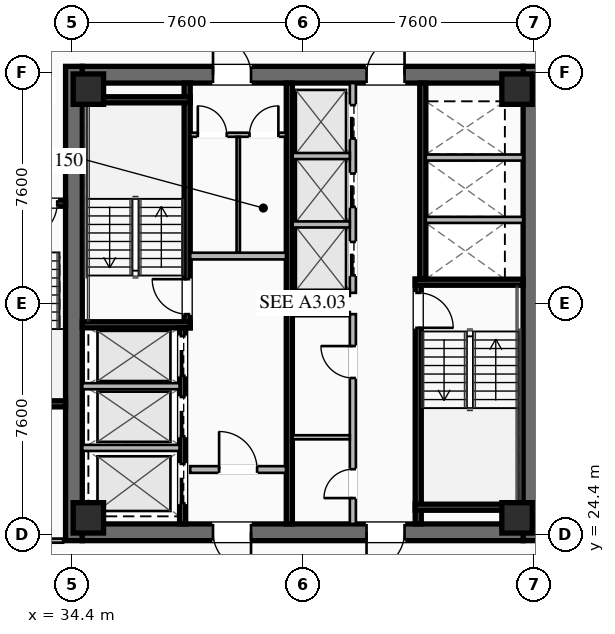
"""IFC4 building model, lengths in metres.
Left out: names, types, materials, properties, quantities, classifications, styles, units other than length and angle.
Written with IfcOpenShell. Run it as: python <this file> out.ifc"""

import sys

from ifc_helpers import new_model, si_unit, direction, frame, frame_2d, origin, origin_2d, place, context, subcontext, project, spatial, rectangle, hollow_rectangle, extrude, element, fill, save


model = new_model("IFC4")
c1 = context("Model", 3, precision=1e-05, world=origin(), true_north=direction((0.0, 1.0)))
c2 = subcontext(c1, "Body", "Model", "MODEL_VIEW")
j1 = project(units=[si_unit("LENGTHUNIT", "METRE"), si_unit("PLANEANGLEUNIT", "RADIAN")], contexts=[c1])
p1 = place(None, origin())
s1 = spatial("IfcSite", under=j1, at=p1, CompositionType="ELEMENT")
p2 = place(p1, origin())
s2 = spatial("IfcBuilding", under=s1, at=p2, CompositionType="ELEMENT")
p3 = place(p2, frame((0.0, 0.0, 125.05)))
s3 = spatial("IfcBuildingStorey", under=s2, at=p3, CompositionType="ELEMENT", Elevation=125.05)
for number, where, z_axis, x_axis in (
    (1, (34.475, 24.2, 0.0), (0.0, 0.0, 1.0), (0.0, 1.0, 0.0)),
    (2, (49.525, 39.8, 0.0), (0.0, 0.0, 1.0), (0.0, -1.0, 0.0)),
):
    element("IfcWall", number, at=place(p3, frame(where, z_axis=z_axis, x_axis=x_axis)), inside=s3, PredefinedType="SHEAR", context=c2, shape_type="SweptSolid", body=[
        extrude(rectangle(XDim=15.6, YDim=0.55, at=frame_2d((7.8, 0.0))), origin(), (0.0, 0.0, 1.0), 3.55),
    ])
p4 = place(p3, frame((49.25, 24.475, 0.0), z_axis=(0.0, 0.0, 1.0), x_axis=(-1.0, 0.0, 0.0)))
e3 = element("IfcWall", 3, at=p4, inside=s3, PredefinedType="SHEAR", context=c2, shape_type="SweptSolid", body=[
    extrude(rectangle(XDim=14.5, YDim=0.55, at=frame_2d((7.25, 0.0))), origin(), (0.0, 0.0, 1.0), 3.55),
])
p5 = place(p4, frame((8.95, 0.0, 0.0)))
e4 = element("IfcOpeningElement", 4, at=p5, cuts=e3, PredefinedType="OPENING", context=c2, shape_type="SweptSolid", body=[
    extrude(rectangle(XDim=1.25, YDim=2.25, at=frame_2d((0.625, 1.125))), frame((0.0, 0.285, 0.0), z_axis=(0.0, -1.0, 0.0), x_axis=(1.0, 0.0, 0.0)), (0.0, 0.0, 1.0), 0.57),
])
p6 = place(p4, frame((3.9, 0.0, 0.0)))
e5 = element("IfcOpeningElement", 5, at=p6, cuts=e3, PredefinedType="OPENING", context=c2, shape_type="SweptSolid", body=[
    extrude(rectangle(XDim=1.25, YDim=2.25, at=frame_2d((0.625, 1.125))), frame((0.0, 0.285, 0.0), z_axis=(0.0, -1.0, 0.0), x_axis=(1.0, 0.0, 0.0)), (0.0, 0.0, 1.0), 0.57),
])
p7 = place(p3, frame((34.75, 39.525, 0.0), z_axis=(0.0, 0.0, 1.0), x_axis=(1.0, 0.0, 0.0)))
e6 = element("IfcWall", 6, at=p7, inside=s3, PredefinedType="SHEAR", context=c2, shape_type="SweptSolid", body=[
    extrude(rectangle(XDim=14.5, YDim=0.55, at=frame_2d((7.25, 0.0))), origin(), (0.0, 0.0, 1.0), 3.55),
])
p8 = place(p7, frame((4.3, 0.0, 0.0)))
e7 = element("IfcOpeningElement", 7, at=p8, cuts=e6, PredefinedType="OPENING", context=c2, shape_type="SweptSolid", body=[
    extrude(rectangle(XDim=1.25, YDim=2.25, at=frame_2d((0.625, 1.125))), frame((0.0, 0.285, 0.0), z_axis=(0.0, -1.0, 0.0), x_axis=(1.0, 0.0, 0.0)), (0.0, 0.0, 1.0), 0.57),
])
p9 = place(p7, frame((9.35, 0.0, 0.0)))
e8 = element("IfcOpeningElement", 8, at=p9, cuts=e6, PredefinedType="OPENING", context=c2, shape_type="SweptSolid", body=[
    extrude(rectangle(XDim=1.25, YDim=2.25, at=frame_2d((0.625, 1.125))), frame((0.0, 0.285, 0.0), z_axis=(0.0, -1.0, 0.0), x_axis=(1.0, 0.0, 0.0)), (0.0, 0.0, 1.0), 0.57),
])
for number, where, z_axis, x_axis in (
    (9, (34.95, 24.95, 0.0), (0.0, 0.0, 1.0), (1.0, 0.0, 0.0)),
    (10, (49.05, 24.95, 0.0), (0.0, 0.0, 1.0), (1.0, 0.0, 0.0)),
    (11, (49.05, 39.05, 0.0), (0.0, 0.0, 1.0), (1.0, 0.0, 0.0)),
    (12, (34.95, 39.05, 0.0), (0.0, 0.0, 1.0), (1.0, 0.0, 0.0)),
):
    element("IfcColumn", number, at=place(p3, frame(where, z_axis=z_axis, x_axis=x_axis)), inside=s3, PredefinedType="COLUMN", context=c2, shape_type="SweptSolid", body=[
        extrude(hollow_rectangle(XDim=1.0, YDim=1.0, WallThickness=0.04, at=origin_2d()), origin(), (0.0, 0.0, 1.0), 3.37),
    ])
p10 = place(p3, frame((38.2, 31.2, 0.0), z_axis=(0.0, 0.0, 1.0), x_axis=(0.0, 1.0, 0.0)))
e13 = element("IfcWall", 13, at=p10, inside=s3, PredefinedType="SHEAR", context=c2, shape_type="SweptSolid", body=[
    extrude(rectangle(XDim=8.05, YDim=0.2, at=frame_2d((4.025, 0.0))), origin(), (0.0, 0.0, 1.0), 3.37),
])
p11 = place(p10, frame((0.45, 0.0, 0.0)))
e14 = element("IfcOpeningElement", 14, at=p11, cuts=e13, PredefinedType="OPENING", context=c2, shape_type="SweptSolid", body=[
    extrude(rectangle(XDim=1.15, YDim=2.2, at=frame_2d((0.575, 1.1))), frame((0.0, 0.11, 0.0), z_axis=(0.0, -1.0, 0.0), x_axis=(1.0, 0.0, 0.0)), (0.0, 0.0, 1.0), 0.22),
])
for number, where, z_axis, x_axis in (
    (15, (34.75, 31.3, 0.0), (0.0, 0.0, 1.0), (1.0, 0.0, 0.0)),
    (16, (34.75, 38.7, 0.0), (0.0, 0.0, 1.0), (1.0, 0.0, 0.0)),
):
    element("IfcWall", number, at=place(p3, frame(where, z_axis=z_axis, x_axis=x_axis)), inside=s3, PredefinedType="SHEAR", context=c2, shape_type="SweptSolid", body=[
        extrude(rectangle(XDim=3.55, YDim=0.2, at=frame_2d((1.775, 0.0))), origin(), (0.0, 0.0, 1.0), 3.37),
    ])
p12 = place(p3, frame((45.8, 32.8, 0.0), z_axis=(0.0, 0.0, 1.0), x_axis=(0.0, -1.0, 0.0)))
e17 = element("IfcWall", 17, at=p12, inside=s3, PredefinedType="SHEAR", context=c2, shape_type="SweptSolid", body=[
    extrude(rectangle(XDim=8.05, YDim=0.2, at=frame_2d((4.025, 0.0))), origin(), (0.0, 0.0, 1.0), 3.37),
])
p13 = place(p12, frame((0.45, 0.0, 0.0)))
e18 = element("IfcOpeningElement", 18, at=p13, cuts=e17, PredefinedType="OPENING", context=c2, shape_type="SweptSolid", body=[
    extrude(rectangle(XDim=1.15, YDim=2.2, at=frame_2d((0.575, 1.1))), frame((0.0, 0.11, 0.0), z_axis=(0.0, -1.0, 0.0), x_axis=(1.0, 0.0, 0.0)), (0.0, 0.0, 1.0), 0.22),
])
for number, where, z_axis, x_axis in (
    (19, (45.7, 32.7, 0.0), (0.0, 0.0, 1.0), (1.0, 0.0, 0.0)),
    (20, (45.7, 25.3, 0.0), (0.0, 0.0, 1.0), (1.0, 0.0, 0.0)),
):
    element("IfcWall", number, at=place(p3, frame(where, z_axis=z_axis, x_axis=x_axis)), inside=s3, PredefinedType="SHEAR", context=c2, shape_type="SweptSolid", body=[
        extrude(rectangle(XDim=3.55, YDim=0.2, at=frame_2d((1.775, 0.0))), origin(), (0.0, 0.0, 1.0), 3.37),
    ])
p14 = place(p3, frame((41.56, 24.75, 0.0), z_axis=(0.0, 0.0, 1.0), x_axis=(0.0, 1.0, 0.0)))
e21 = element("IfcWall", 21, at=p14, inside=s3, PredefinedType="SHEAR", context=c2, shape_type="SweptSolid", body=[
    extrude(rectangle(XDim=14.5, YDim=0.2, at=frame_2d((7.25, 0.0))), origin(), (0.0, 0.0, 1.0), 3.37),
])
p15 = place(p3, frame((38.3, 33.56, 0.0), z_axis=(0.0, 0.0, 1.0), x_axis=(1.0, 0.0, 0.0)))
e22 = element("IfcWall", 22, at=p15, inside=s3, PredefinedType="SOLIDWALL", context=c2, shape_type="SweptSolid", body=[
    extrude(rectangle(XDim=3.15, YDim=0.22, at=frame_2d((1.575, 0.0))), origin(), (0.0, 0.0, 1.0), 2.723),
])
p16 = place(p3, frame((38.3, 26.54, 0.0), z_axis=(0.0, 0.0, 1.0), x_axis=(1.0, 0.0, 0.0)))
e23 = element("IfcWall", 23, at=p16, inside=s3, PredefinedType="SOLIDWALL", context=c2, shape_type="SweptSolid", body=[
    extrude(rectangle(XDim=3.15, YDim=0.22, at=frame_2d((1.575, 0.0))), origin(), (0.0, 0.0, 1.0), 2.723),
])
p17 = place(p16, frame((0.95, 0.0, 0.0)))
e24 = element("IfcOpeningElement", 24, at=p17, cuts=e23, PredefinedType="OPENING", context=c2, shape_type="SweptSolid", body=[
    extrude(rectangle(XDim=1.25, YDim=2.25, at=frame_2d((0.625, 1.125))), frame((0.0, 0.12, 0.0), z_axis=(0.0, -1.0, 0.0), x_axis=(1.0, 0.0, 0.0)), (0.0, 0.0, 1.0), 0.24),
])
p18 = place(p3, frame((38.05, 24.75, 0.0), z_axis=(0.0, 0.0, 1.0), x_axis=(0.0, 1.0, 0.0)))
e25 = element("IfcWall", 25, at=p18, inside=s3, PredefinedType="SHEAR", context=c2, shape_type="SweptSolid", body=[
    extrude(rectangle(XDim=6.45, YDim=0.2, at=frame_2d((3.225, 0.0))), origin(), (0.0, 0.0, 1.0), 3.37),
])
p19 = place(p18, frame((4.875, 0.0, 0.0)))
e26 = element("IfcOpeningElement", 26, at=p19, cuts=e25, PredefinedType="OPENING", context=c2, shape_type="SweptSolid", body=[
    extrude(rectangle(XDim=1.3, YDim=2.25, at=frame_2d((0.65, 1.125))), frame((0.0, 0.11, 0.0), z_axis=(0.0, -1.0, 0.0), x_axis=(1.0, 0.0, 0.0)), (0.0, 0.0, 1.0), 0.22),
])
p20 = place(p18, frame((2.875, 0.0, 0.0)))
e27 = element("IfcOpeningElement", 27, at=p20, cuts=e25, PredefinedType="OPENING", context=c2, shape_type="SweptSolid", body=[
    extrude(rectangle(XDim=1.3, YDim=2.25, at=frame_2d((0.65, 1.125))), frame((0.0, 0.11, 0.0), z_axis=(0.0, -1.0, 0.0), x_axis=(1.0, 0.0, 0.0)), (0.0, 0.0, 1.0), 0.22),
])
p21 = place(p18, frame((0.675, 0.0, 0.0)))
e28 = element("IfcOpeningElement", 28, at=p21, cuts=e25, PredefinedType="OPENING", context=c2, shape_type="SweptSolid", body=[
    extrude(rectangle(XDim=1.3, YDim=2.25, at=frame_2d((0.65, 1.125))), frame((0.0, 0.11, 0.0), z_axis=(0.0, -1.0, 0.0), x_axis=(1.0, 0.0, 0.0)), (0.0, 0.0, 1.0), 0.22),
])
for number, where, z_axis, x_axis in (
    (29, (34.75, 27.25, 0.0), (0.0, 0.0, 1.0), (1.0, 0.0, 0.0)),
    (30, (34.75, 29.28, 0.0), (0.0, 0.0, 1.0), (1.0, 0.0, 0.0)),
):
    element("IfcWall", number, at=place(p3, frame(where, z_axis=z_axis, x_axis=x_axis)), inside=s3, PredefinedType="SOLIDWALL", context=c2, shape_type="SweptSolid", body=[
        extrude(rectangle(XDim=3.2, YDim=0.2, at=frame_2d((1.6, 0.0))), origin(), (0.0, 0.0, 1.0), 3.37),
    ])
p22 = place(p3, frame((45.95, 39.25, 0.0), z_axis=(0.0, 0.0, 1.0), x_axis=(0.0, -1.0, 0.0)))
e31 = element("IfcWall", 31, at=p22, inside=s3, PredefinedType="SHEAR", context=c2, shape_type="SweptSolid", body=[
    extrude(rectangle(XDim=6.45, YDim=0.2, at=frame_2d((3.225, 0.0))), origin(), (0.0, 0.0, 1.0), 3.37),
])
for number, where, z_axis, x_axis in (
    (32, (46.05, 34.75, 0.0), (0.0, 0.0, 1.0), (1.0, 0.0, 0.0)),
    (33, (46.05, 36.8, 0.0), (0.0, 0.0, 1.0), (1.0, 0.0, 0.0)),
):
    element("IfcWall", number, at=place(p3, frame(where, z_axis=z_axis, x_axis=x_axis)), inside=s3, PredefinedType="SOLIDWALL", context=c2, shape_type="SweptSolid", body=[
        extrude(rectangle(XDim=3.2, YDim=0.2, at=frame_2d((1.6, 0.0))), origin(), (0.0, 0.0, 1.0), 3.37),
    ])
p23 = place(p3, frame((38.3, 37.55, 0.0), z_axis=(0.0, 0.0, 1.0), x_axis=(1.0, 0.0, 0.0)))
e34 = element("IfcWall", 34, at=p23, inside=s3, PredefinedType="PARTITIONING", context=c2, shape_type="SweptSolid", body=[
    extrude(rectangle(XDim=3.15, YDim=0.135, at=frame_2d((1.575, 0.0))), origin(), (0.0, 0.0, 1.0), 2.723),
])
p24 = place(p23, frame((0.25, 0.0, 0.0)))
e35 = element("IfcOpeningElement", 35, at=p24, cuts=e34, PredefinedType="OPENING", context=c2, shape_type="SweptSolid", body=[
    extrude(rectangle(XDim=0.95, YDim=2.05, at=frame_2d((0.475, 1.025))), frame((0.0, 0.077, 0.0), z_axis=(0.0, -1.0, 0.0), x_axis=(1.0, 0.0, 0.0)), (0.0, 0.0, 1.0), 0.155),
])
p25 = place(p23, frame((1.95, 0.0, 0.0)))
e36 = element("IfcOpeningElement", 36, at=p25, cuts=e34, PredefinedType="OPENING", context=c2, shape_type="SweptSolid", body=[
    extrude(rectangle(XDim=0.95, YDim=2.05, at=frame_2d((0.475, 1.025))), frame((0.0, 0.077, 0.0), z_axis=(0.0, -1.0, 0.0), x_axis=(1.0, 0.0, 0.0)), (0.0, 0.0, 1.0), 0.155),
])
p26 = place(p3, frame((39.88, 33.68, 0.0), z_axis=(0.0, 0.0, 1.0), x_axis=(0.0, 1.0, 0.0)))
e37 = element("IfcWall", 37, at=p26, inside=s3, PredefinedType="PARTITIONING", context=c2, shape_type="SweptSolid", body=[
    extrude(rectangle(XDim=3.8, YDim=0.11, at=frame_2d((1.9, 0.0))), origin(), (0.0, 0.0, 1.0), 2.723),
])
p27 = place(p3, frame((43.65, 24.75, 0.0), z_axis=(0.0, 0.0, 1.0), x_axis=(0.0, 1.0, 0.0)))
e38 = element("IfcWall", 38, at=p27, inside=s3, PredefinedType="SOLIDWALL", context=c2, shape_type="SweptSolid", body=[
    extrude(rectangle(XDim=6.9, YDim=0.2, at=frame_2d((3.45, 0.0))), origin(), (0.0, 0.0, 1.0), 2.723),
])
p28 = place(p27, frame((0.85, 0.0, 0.0)))
e39 = element("IfcOpeningElement", 39, at=p28, cuts=e38, PredefinedType="OPENING", context=c2, shape_type="SweptSolid", body=[
    extrude(rectangle(XDim=0.95, YDim=2.05, at=frame_2d((0.475, 1.025))), frame((0.0, 0.11, 0.0), z_axis=(0.0, -1.0, 0.0), x_axis=(1.0, 0.0, 0.0)), (0.0, 0.0, 1.0), 0.22),
])
p29 = place(p27, frame((4.8, 0.0, 0.0)))
e40 = element("IfcOpeningElement", 40, at=p29, cuts=e38, PredefinedType="OPENING", context=c2, shape_type="SweptSolid", body=[
    extrude(rectangle(XDim=1.05, YDim=2.2, at=frame_2d((0.525, 1.1))), frame((0.0, 0.11, 0.0), z_axis=(0.0, -1.0, 0.0), x_axis=(1.0, 0.0, 0.0)), (0.0, 0.0, 1.0), 0.22),
])
for number, where, z_axis, x_axis in (
    (41, (41.67, 31.65, 0.0), (0.0, 0.0, 1.0), (1.0, 0.0, 0.0)),
    (42, (41.67, 27.6, 0.0), (0.0, 0.0, 1.0), (1.0, 0.0, 0.0)),
):
    element("IfcWall", number, at=place(p3, frame(where, z_axis=z_axis, x_axis=x_axis)), inside=s3, PredefinedType="PARTITIONING", context=c2, shape_type="SweptSolid", body=[
        extrude(rectangle(XDim=1.88, YDim=0.135, at=frame_2d((0.94, 0.0))), origin(), (0.0, 0.0, 1.0), 2.723),
    ])
p30 = place(p3, frame((43.65, 32.35, 0.0), z_axis=(0.0, 0.0, 1.0), x_axis=(0.0, 1.0, 0.0)))
e43 = element("IfcWall", 43, at=p30, inside=s3, PredefinedType="SOLIDWALL", context=c2, shape_type="SweptSolid", body=[
    extrude(rectangle(XDim=6.9, YDim=0.2, at=frame_2d((3.45, 0.0))), origin(), (0.0, 0.0, 1.0), 3.37),
])
p31 = place(p30, frame((0.575, 0.0, 0.0)))
e44 = element("IfcOpeningElement", 44, at=p31, cuts=e43, PredefinedType="OPENING", context=c2, shape_type="SweptSolid", body=[
    extrude(rectangle(XDim=1.1, YDim=2.2, at=frame_2d((0.55, 1.1))), frame((0.0, 0.11, 0.0), z_axis=(0.0, -1.0, 0.0), x_axis=(1.0, 0.0, 0.0)), (0.0, 0.0, 1.0), 0.22),
])
p32 = place(p30, frame((2.825, 0.0, 0.0)))
e45 = element("IfcOpeningElement", 45, at=p32, cuts=e43, PredefinedType="OPENING", context=c2, shape_type="SweptSolid", body=[
    extrude(rectangle(XDim=1.1, YDim=2.2, at=frame_2d((0.55, 1.1))), frame((0.0, 0.11, 0.0), z_axis=(0.0, -1.0, 0.0), x_axis=(1.0, 0.0, 0.0)), (0.0, 0.0, 1.0), 0.22),
])
p33 = place(p30, frame((5.075, 0.0, 0.0)))
e46 = element("IfcOpeningElement", 46, at=p33, cuts=e43, PredefinedType="OPENING", context=c2, shape_type="SweptSolid", body=[
    extrude(rectangle(XDim=1.1, YDim=2.2, at=frame_2d((0.55, 1.1))), frame((0.0, 0.11, 0.0), z_axis=(0.0, -1.0, 0.0), x_axis=(1.0, 0.0, 0.0)), (0.0, 0.0, 1.0), 0.22),
])
for number, where, z_axis, x_axis in (
    (47, (41.67, 32.35, 0.0), (0.0, 0.0, 1.0), (1.0, 0.0, 0.0)),
    (48, (41.67, 34.6, 0.0), (0.0, 0.0, 1.0), (1.0, 0.0, 0.0)),
    (49, (41.67, 36.85, 0.0), (0.0, 0.0, 1.0), (1.0, 0.0, 0.0)),
):
    element("IfcWall", number, at=place(p3, frame(where, z_axis=z_axis, x_axis=x_axis)), inside=s3, PredefinedType="SOLIDWALL", context=c2, shape_type="SweptSolid", body=[
        extrude(rectangle(XDim=1.88, YDim=0.2, at=frame_2d((0.94, 0.0))), origin(), (0.0, 0.0, 1.0), 3.37),
    ])
p34 = place(p3, frame((34.2, 35.3, 0.0), z_axis=(0.0, 0.0, 1.0), x_axis=(-1.0, 0.0, 0.0)))
e50 = element("IfcWall", 50, at=p34, inside=s3, PredefinedType="SHEAR", context=c2, shape_type="SweptSolid", body=[
    extrude(rectangle(XDim=3.4, YDim=0.2, at=frame_2d((1.7, 0.0))), origin(), (0.0, 0.0, 1.0), 3.37),
])
p35 = place(p34, frame((0.275, 0.0, 0.0)))
e51 = element("IfcOpeningElement", 51, at=p35, cuts=e50, PredefinedType="OPENING", context=c2, shape_type="SweptSolid", body=[
    extrude(rectangle(XDim=1.15, YDim=2.2, at=frame_2d((0.575, 1.1))), frame((0.0, 0.11, 0.0), z_axis=(0.0, -1.0, 0.0), x_axis=(1.0, 0.0, 0.0)), (0.0, 0.0, 1.0), 0.22),
])
p36 = place(p3, frame((30.8, 28.7, 0.0), z_axis=(0.0, 0.0, 1.0), x_axis=(1.0, 0.0, 0.0)))
e52 = element("IfcWall", 52, at=p36, inside=s3, PredefinedType="SHEAR", context=c2, shape_type="SweptSolid", body=[
    extrude(rectangle(XDim=3.4, YDim=0.2, at=frame_2d((1.7, 0.0))), origin(), (0.0, 0.0, 1.0), 3.37),
])
p37 = place(p3, frame((22.72, 24.2, 0.0), z_axis=(0.0, 0.0, 1.0), x_axis=(1.0, 0.0, 0.0)))
e53 = element("IfcWall", 53, at=p37, inside=s3, PredefinedType="PARTITIONING", context=c2, shape_type="SweptSolid", body=[
    extrude(rectangle(XDim=11.4, YDim=0.135, at=frame_2d((5.7, 0.0))), origin(), (0.0, 0.0, 1.0), 2.723),
])
p38 = place(p37, frame((8.405, 0.0, 0.0)))
e54 = element("IfcOpeningElement", 54, at=p38, cuts=e53, PredefinedType="OPENING", context=c2, shape_type="SweptSolid", body=[
    extrude(rectangle(XDim=0.95, YDim=2.05, at=frame_2d((0.475, 1.025))), frame((0.0, 0.077, 0.0), z_axis=(0.0, -1.0, 0.0), x_axis=(1.0, 0.0, 0.0)), (0.0, 0.0, 1.0), 0.155),
])
p39 = place(p8, origin())
e55 = element("IfcDoor", 55, at=p39, inside=s3, OperationType="SINGLE_SWING_LEFT", PredefinedType="DOOR", context=c2, shape_type="SweptSolid", body=[
    extrude(rectangle(XDim=1.25, YDim=2.25, at=frame_2d((0.625, 1.125))), frame((0.0, 0.025, 0.0), z_axis=(0.0, -1.0, 0.0), x_axis=(1.0, 0.0, 0.0)), (0.0, 0.0, 1.0), 0.05),
])
fill(e7, e55)
p40 = place(p9, origin())
e56 = element("IfcDoor", 56, at=p40, inside=s3, OperationType="SINGLE_SWING_RIGHT", PredefinedType="DOOR", context=c2, shape_type="SweptSolid", body=[
    extrude(rectangle(XDim=1.25, YDim=2.25, at=frame_2d((0.625, 1.125))), frame((0.0, 0.025, 0.0), z_axis=(0.0, -1.0, 0.0), x_axis=(1.0, 0.0, 0.0)), (0.0, 0.0, 1.0), 0.05),
])
fill(e8, e56)
p41 = place(p5, origin())
e57 = element("IfcDoor", 57, at=p41, inside=s3, OperationType="SINGLE_SWING_LEFT", PredefinedType="DOOR", context=c2, shape_type="SweptSolid", body=[
    extrude(rectangle(XDim=1.25, YDim=2.25, at=frame_2d((0.625, 1.125))), frame((0.0, 0.025, 0.0), z_axis=(0.0, -1.0, 0.0), x_axis=(1.0, 0.0, 0.0)), (0.0, 0.0, 1.0), 0.05),
])
fill(e4, e57)
p42 = place(p6, origin())
e58 = element("IfcDoor", 58, at=p42, inside=s3, OperationType="SINGLE_SWING_RIGHT", PredefinedType="DOOR", context=c2, shape_type="SweptSolid", body=[
    extrude(rectangle(XDim=1.25, YDim=2.25, at=frame_2d((0.625, 1.125))), frame((0.0, 0.025, 0.0), z_axis=(0.0, -1.0, 0.0), x_axis=(1.0, 0.0, 0.0)), (0.0, 0.0, 1.0), 0.05),
])
fill(e5, e58)
p43 = place(p11, origin())
e59 = element("IfcDoor", 59, at=p43, inside=s3, OperationType="SINGLE_SWING_RIGHT", PredefinedType="DOOR", context=c2, shape_type="SweptSolid", body=[
    extrude(rectangle(XDim=1.15, YDim=2.2, at=frame_2d((0.575, 1.1))), frame((0.0, 0.025, 0.0), z_axis=(0.0, -1.0, 0.0), x_axis=(1.0, 0.0, 0.0)), (0.0, 0.0, 1.0), 0.05),
])
fill(e14, e59)
p44 = place(p13, origin())
e60 = element("IfcDoor", 60, at=p44, inside=s3, OperationType="SINGLE_SWING_RIGHT", PredefinedType="DOOR", context=c2, shape_type="SweptSolid", body=[
    extrude(rectangle(XDim=1.15, YDim=2.2, at=frame_2d((0.575, 1.1))), frame((0.0, 0.025, 0.0), z_axis=(0.0, -1.0, 0.0), x_axis=(1.0, 0.0, 0.0)), (0.0, 0.0, 1.0), 0.05),
])
fill(e18, e60)
p45 = place(p17, origin())
e61 = element("IfcDoor", 61, at=p45, inside=s3, OperationType="SINGLE_SWING_LEFT", PredefinedType="DOOR", context=c2, shape_type="SweptSolid", body=[
    extrude(rectangle(XDim=1.25, YDim=2.25, at=frame_2d((0.625, 1.125))), frame((0.0, 0.025, 0.0), z_axis=(0.0, -1.0, 0.0), x_axis=(1.0, 0.0, 0.0)), (0.0, 0.0, 1.0), 0.05),
])
fill(e24, e61)
p46 = place(p24, origin())
e62 = element("IfcDoor", 62, at=p46, inside=s3, OperationType="SINGLE_SWING_LEFT", PredefinedType="DOOR", context=c2, shape_type="SweptSolid", body=[
    extrude(rectangle(XDim=0.95, YDim=2.05, at=frame_2d((0.475, 1.025))), frame((0.0, 0.025, 0.0), z_axis=(0.0, -1.0, 0.0), x_axis=(1.0, 0.0, 0.0)), (0.0, 0.0, 1.0), 0.05),
])
fill(e35, e62)
p47 = place(p25, origin())
e63 = element("IfcDoor", 63, at=p47, inside=s3, OperationType="SINGLE_SWING_RIGHT", PredefinedType="DOOR", context=c2, shape_type="SweptSolid", body=[
    extrude(rectangle(XDim=0.95, YDim=2.05, at=frame_2d((0.475, 1.025))), frame((0.0, 0.025, 0.0), z_axis=(0.0, -1.0, 0.0), x_axis=(1.0, 0.0, 0.0)), (0.0, 0.0, 1.0), 0.05),
])
fill(e36, e63)
p48 = place(p28, origin())
e64 = element("IfcDoor", 64, at=p48, inside=s3, OperationType="SINGLE_SWING_LEFT", PredefinedType="DOOR", context=c2, shape_type="SweptSolid", body=[
    extrude(rectangle(XDim=0.95, YDim=2.05, at=frame_2d((0.475, 1.025))), frame((0.0, 0.025, 0.0), z_axis=(0.0, -1.0, 0.0), x_axis=(1.0, 0.0, 0.0)), (0.0, 0.0, 1.0), 0.05),
])
fill(e39, e64)
p49 = place(p29, origin())
e65 = element("IfcDoor", 65, at=p49, inside=s3, OperationType="SINGLE_SWING_RIGHT", PredefinedType="DOOR", context=c2, shape_type="SweptSolid", body=[
    extrude(rectangle(XDim=1.05, YDim=2.2, at=frame_2d((0.525, 1.1))), frame((0.0, 0.025, 0.0), z_axis=(0.0, -1.0, 0.0), x_axis=(1.0, 0.0, 0.0)), (0.0, 0.0, 1.0), 0.05),
])
fill(e40, e65)
p50 = place(p35, origin())
e66 = element("IfcDoor", 66, at=p50, inside=s3, OperationType="SINGLE_SWING_RIGHT", PredefinedType="DOOR", context=c2, shape_type="SweptSolid", body=[
    extrude(rectangle(XDim=1.15, YDim=2.2, at=frame_2d((0.575, 1.1))), frame((0.0, 0.025, 0.0), z_axis=(0.0, -1.0, 0.0), x_axis=(1.0, 0.0, 0.0)), (0.0, 0.0, 1.0), 0.05),
])
fill(e51, e66)
p51 = place(p19, origin())
e67 = element("IfcDoor", 67, at=p51, inside=s3, OperationType="SLIDING_TO_LEFT", PredefinedType="DOOR", context=c2, shape_type="SweptSolid", body=[
    extrude(rectangle(XDim=1.3, YDim=2.25, at=frame_2d((0.65, 1.125))), frame((0.0, 0.025, 0.0), z_axis=(0.0, -1.0, 0.0), x_axis=(1.0, 0.0, 0.0)), (0.0, 0.0, 1.0), 0.05),
])
fill(e26, e67)
p52 = place(p20, origin())
e68 = element("IfcDoor", 68, at=p52, inside=s3, OperationType="SLIDING_TO_LEFT", PredefinedType="DOOR", context=c2, shape_type="SweptSolid", body=[
    extrude(rectangle(XDim=1.3, YDim=2.25, at=frame_2d((0.65, 1.125))), frame((0.0, 0.025, 0.0), z_axis=(0.0, -1.0, 0.0), x_axis=(1.0, 0.0, 0.0)), (0.0, 0.0, 1.0), 0.05),
])
fill(e27, e68)
p53 = place(p21, origin())
e69 = element("IfcDoor", 69, at=p53, inside=s3, OperationType="SLIDING_TO_LEFT", PredefinedType="DOOR", context=c2, shape_type="SweptSolid", body=[
    extrude(rectangle(XDim=1.3, YDim=2.25, at=frame_2d((0.65, 1.125))), frame((0.0, 0.025, 0.0), z_axis=(0.0, -1.0, 0.0), x_axis=(1.0, 0.0, 0.0)), (0.0, 0.0, 1.0), 0.05),
])
fill(e28, e69)
p54 = place(p31, origin())
e70 = element("IfcDoor", 70, at=p54, inside=s3, OperationType="SLIDING_TO_LEFT", PredefinedType="DOOR", context=c2, shape_type="SweptSolid", body=[
    extrude(rectangle(XDim=1.1, YDim=2.2, at=frame_2d((0.55, 1.1))), frame((0.0, 0.025, 0.0), z_axis=(0.0, -1.0, 0.0), x_axis=(1.0, 0.0, 0.0)), (0.0, 0.0, 1.0), 0.05),
])
fill(e44, e70)
p55 = place(p32, origin())
e71 = element("IfcDoor", 71, at=p55, inside=s3, OperationType="SLIDING_TO_LEFT", PredefinedType="DOOR", context=c2, shape_type="SweptSolid", body=[
    extrude(rectangle(XDim=1.1, YDim=2.2, at=frame_2d((0.55, 1.1))), frame((0.0, 0.025, 0.0), z_axis=(0.0, -1.0, 0.0), x_axis=(1.0, 0.0, 0.0)), (0.0, 0.0, 1.0), 0.05),
])
fill(e45, e71)
p56 = place(p33, origin())
e72 = element("IfcDoor", 72, at=p56, inside=s3, OperationType="SLIDING_TO_LEFT", PredefinedType="DOOR", context=c2, shape_type="SweptSolid", body=[
    extrude(rectangle(XDim=1.1, YDim=2.2, at=frame_2d((0.55, 1.1))), frame((0.0, 0.025, 0.0), z_axis=(0.0, -1.0, 0.0), x_axis=(1.0, 0.0, 0.0)), (0.0, 0.0, 1.0), 0.05),
])
fill(e46, e72)
save(model, sys.argv[1])
